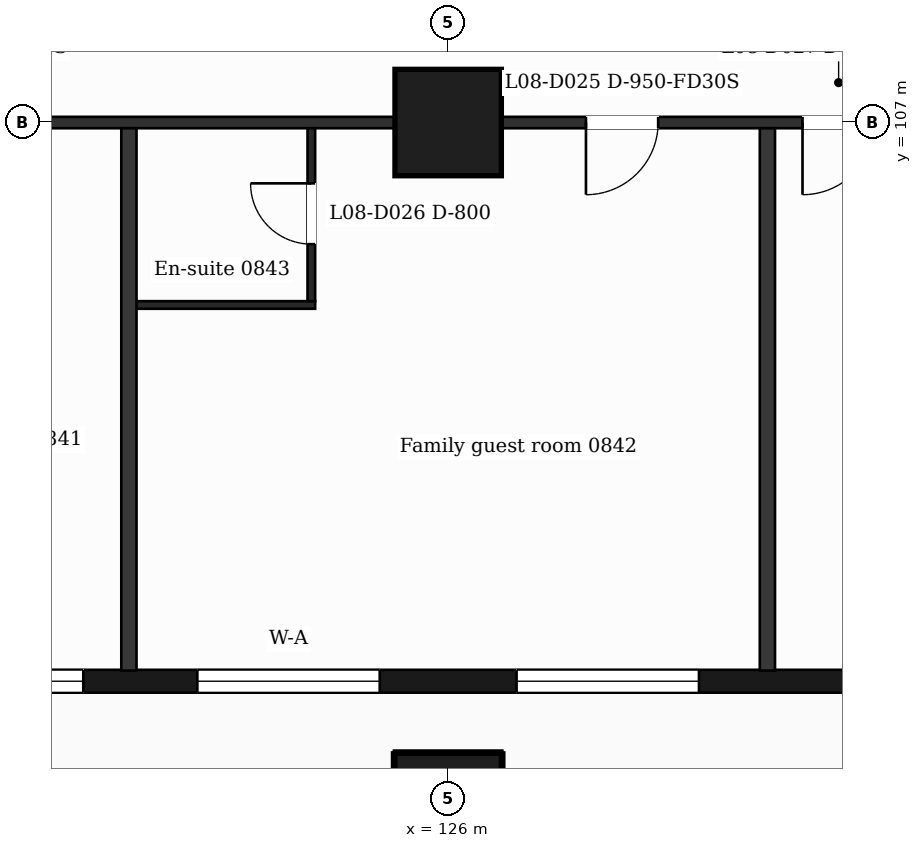
"""IFC4 building model, lengths in metres.
Left out: names, types, materials, properties, quantities, classifications, styles, units other than length and angle.
Written with IfcOpenShell. Run it as: python <this file> out.ifc"""

import sys

from ifc_helpers import new_model, si_unit, direction, frame, frame_2d, origin, origin_2d, place, context, subcontext, project, spatial, rectangle, extrude, element, fill, save


model = new_model("IFC4")
c1 = context("Model", 3, precision=1e-05, world=origin(), true_north=direction((0.0, 1.0)))
c2 = subcontext(c1, "Body", "Model", "MODEL_VIEW")
j1 = project(units=[si_unit("LENGTHUNIT", "METRE"), si_unit("PLANEANGLEUNIT", "RADIAN")], contexts=[c1])
p1 = place(None, origin())
s1 = spatial("IfcSite", under=j1, at=p1, CompositionType="ELEMENT")
p2 = place(p1, origin())
s2 = spatial("IfcBuilding", under=s1, at=p2, CompositionType="ELEMENT")
p3 = place(p2, frame((0.0, 0.0, 46.0)))
s3 = spatial("IfcBuildingStorey", under=s2, at=p3, CompositionType="ELEMENT", Elevation=46.0)
for number, where, z_axis, x_axis in (
    (1, (126.0, 98.0, 0.0), (0.0, 0.0, 1.0), (1.0, 0.0, 0.0)),
    (2, (126.0, 107.0, 0.0), (0.0, 0.0, 1.0), (1.0, 0.0, 0.0)),
):
    element("IfcColumn", number, at=place(p3, frame(where, z_axis=z_axis, x_axis=x_axis)), inside=s3, PredefinedType="COLUMN", context=c2, shape_type="SweptSolid", body=[
        extrude(rectangle(XDim=1.4, YDim=1.4, at=origin_2d()), origin(), (0.0, 0.0, 1.0), 3.5),
    ])
p4 = place(p3, frame((89.85, 99.65, 0.0), z_axis=(0.0, 0.0, 1.0), x_axis=(1.0, 0.0, 0.0)))
e3 = element("IfcWall", 3, at=p4, inside=s3, PredefinedType="SOLIDWALL", context=c2, shape_type="SweptSolid", body=[
    extrude(rectangle(XDim=47.25, YDim=0.3, at=frame_2d((23.625, 0.0))), origin(), (0.0, 0.0, 1.0), 3.18),
])
p5 = place(p4, frame((0.725, 0.0, 0.9)))
e4 = element("IfcOpeningElement", 4, at=p5, cuts=e3, PredefinedType="OPENING", context=c2, shape_type="SweptSolid", body=[
    extrude(rectangle(XDim=1.2, YDim=2.1, at=frame_2d((0.6, 1.05))), frame((0.0, 0.16, 0.0), z_axis=(0.0, -1.0, 0.0), x_axis=(1.0, 0.0, 0.0)), (0.0, 0.0, 1.0), 0.32),
])
p6 = place(p4, frame((3.45, 0.0, 0.9)))
e5 = element("IfcOpeningElement", 5, at=p6, cuts=e3, PredefinedType="OPENING", context=c2, shape_type="SweptSolid", body=[
    extrude(rectangle(XDim=2.4, YDim=2.1, at=frame_2d((1.2, 1.05))), frame((0.0, 0.16, 0.0), z_axis=(0.0, -1.0, 0.0), x_axis=(1.0, 0.0, 0.0)), (0.0, 0.0, 1.0), 0.32),
])
p7 = place(p4, frame((7.65, 0.0, 0.9)))
e6 = element("IfcOpeningElement", 6, at=p7, cuts=e3, PredefinedType="OPENING", context=c2, shape_type="SweptSolid", body=[
    extrude(rectangle(XDim=2.4, YDim=2.1, at=frame_2d((1.2, 1.05))), frame((0.0, 0.16, 0.0), z_axis=(0.0, -1.0, 0.0), x_axis=(1.0, 0.0, 0.0)), (0.0, 0.0, 1.0), 0.32),
])
p8 = place(p4, frame((12.45, 0.0, 0.9)))
e7 = element("IfcOpeningElement", 7, at=p8, cuts=e3, PredefinedType="OPENING", context=c2, shape_type="SweptSolid", body=[
    extrude(rectangle(XDim=1.2, YDim=2.1, at=frame_2d((0.6, 1.05))), frame((0.0, 0.16, 0.0), z_axis=(0.0, -1.0, 0.0), x_axis=(1.0, 0.0, 0.0)), (0.0, 0.0, 1.0), 0.32),
])
p9 = place(p4, frame((16.65, 0.0, 0.9)))
e8 = element("IfcOpeningElement", 8, at=p9, cuts=e3, PredefinedType="OPENING", context=c2, shape_type="SweptSolid", body=[
    extrude(rectangle(XDim=1.2, YDim=2.1, at=frame_2d((0.6, 1.05))), frame((0.0, 0.16, 0.0), z_axis=(0.0, -1.0, 0.0), x_axis=(1.0, 0.0, 0.0)), (0.0, 0.0, 1.0), 0.32),
])
p10 = place(p4, frame((19.95, 0.0, 0.9)))
e9 = element("IfcOpeningElement", 9, at=p10, cuts=e3, PredefinedType="OPENING", context=c2, shape_type="SweptSolid", body=[
    extrude(rectangle(XDim=1.2, YDim=2.1, at=frame_2d((0.6, 1.05))), frame((0.0, 0.16, 0.0), z_axis=(0.0, -1.0, 0.0), x_axis=(1.0, 0.0, 0.0)), (0.0, 0.0, 1.0), 0.32),
])
p11 = place(p4, frame((21.75, 0.0, 0.9)))
e10 = element("IfcOpeningElement", 10, at=p11, cuts=e3, PredefinedType="OPENING", context=c2, shape_type="SweptSolid", body=[
    extrude(rectangle(XDim=1.2, YDim=2.1, at=frame_2d((0.6, 1.05))), frame((0.0, 0.16, 0.0), z_axis=(0.0, -1.0, 0.0), x_axis=(1.0, 0.0, 0.0)), (0.0, 0.0, 1.0), 0.32),
])
p12 = place(p4, frame((25.05, 0.0, 0.0)))
e11 = element("IfcOpeningElement", 11, at=p12, cuts=e3, PredefinedType="OPENING", context=c2, shape_type="SweptSolid", body=[
    extrude(rectangle(XDim=1.2, YDim=2.4, at=frame_2d((0.6, 1.2))), frame((0.0, 0.16, 0.0), z_axis=(0.0, -1.0, 0.0), x_axis=(1.0, 0.0, 0.0)), (0.0, 0.0, 1.0), 0.32),
])
p13 = place(p4, frame((28.35, 0.0, 0.9)))
e12 = element("IfcOpeningElement", 12, at=p13, cuts=e3, PredefinedType="OPENING", context=c2, shape_type="SweptSolid", body=[
    extrude(rectangle(XDim=1.2, YDim=2.1, at=frame_2d((0.6, 1.05))), frame((0.0, 0.16, 0.0), z_axis=(0.0, -1.0, 0.0), x_axis=(1.0, 0.0, 0.0)), (0.0, 0.0, 1.0), 0.32),
])
p14 = place(p4, frame((30.15, 0.0, 0.9)))
e13 = element("IfcOpeningElement", 13, at=p14, cuts=e3, PredefinedType="OPENING", context=c2, shape_type="SweptSolid", body=[
    extrude(rectangle(XDim=1.2, YDim=2.1, at=frame_2d((0.6, 1.05))), frame((0.0, 0.16, 0.0), z_axis=(0.0, -1.0, 0.0), x_axis=(1.0, 0.0, 0.0)), (0.0, 0.0, 1.0), 0.32),
])
p15 = place(p4, frame((32.85, 0.0, 0.9)))
e14 = element("IfcOpeningElement", 14, at=p15, cuts=e3, PredefinedType="OPENING", context=c2, shape_type="SweptSolid", body=[
    extrude(rectangle(XDim=2.4, YDim=2.1, at=frame_2d((1.2, 1.05))), frame((0.0, 0.16, 0.0), z_axis=(0.0, -1.0, 0.0), x_axis=(1.0, 0.0, 0.0)), (0.0, 0.0, 1.0), 0.32),
])
p16 = place(p4, frame((37.05, 0.0, 0.9)))
e15 = element("IfcOpeningElement", 15, at=p16, cuts=e3, PredefinedType="OPENING", context=c2, shape_type="SweptSolid", body=[
    extrude(rectangle(XDim=2.4, YDim=2.1, at=frame_2d((1.2, 1.05))), frame((0.0, 0.16, 0.0), z_axis=(0.0, -1.0, 0.0), x_axis=(1.0, 0.0, 0.0)), (0.0, 0.0, 1.0), 0.32),
])
p17 = place(p4, frame((41.85, 0.0, 0.9)))
e16 = element("IfcOpeningElement", 16, at=p17, cuts=e3, PredefinedType="OPENING", context=c2, shape_type="SweptSolid", body=[
    extrude(rectangle(XDim=1.2, YDim=2.1, at=frame_2d((0.6, 1.05))), frame((0.0, 0.16, 0.0), z_axis=(0.0, -1.0, 0.0), x_axis=(1.0, 0.0, 0.0)), (0.0, 0.0, 1.0), 0.32),
])
p18 = place(p4, frame((45.25, 0.0, 0.9)))
e17 = element("IfcOpeningElement", 17, at=p18, cuts=e3, PredefinedType="OPENING", context=c2, shape_type="SweptSolid", body=[
    extrude(rectangle(XDim=1.2, YDim=2.1, at=frame_2d((0.6, 1.05))), frame((0.0, 0.16, 0.0), z_axis=(0.0, -1.0, 0.0), x_axis=(1.0, 0.0, 0.0)), (0.0, 0.0, 1.0), 0.32),
])
p19 = place(p3, frame((121.8, 104.6, 0.0), z_axis=(0.0, 0.0, 1.0), x_axis=(1.0, 0.0, 0.0)))
e18 = element("IfcWall", 18, at=p19, inside=s3, PredefinedType="PARTITIONING", context=c2, shape_type="SweptSolid", body=[
    extrude(rectangle(XDim=2.45, YDim=0.1, at=frame_2d((1.225, 0.0))), origin(), (0.0, 0.0, 1.0), 3.18),
])
p20 = place(p3, frame((87.018, 107.0, 0.0), z_axis=(0.0, 0.0, 1.0), x_axis=(1.0, 0.0, 0.0)))
e19 = element("IfcWall", 19, at=p20, inside=s3, PredefinedType="PARTITIONING", context=c2, shape_type="SweptSolid", body=[
    extrude(rectangle(XDim=52.765, YDim=0.15, at=frame_2d((26.382, 0.0))), origin(), (0.0, 0.0, 1.0), 3.18),
])
p21 = place(p20, frame((1.032, 0.0, 0.0)))
e20 = element("IfcOpeningElement", 20, at=p21, cuts=e19, PredefinedType="OPENING", context=c2, shape_type="SweptSolid", body=[
    extrude(rectangle(XDim=0.95, YDim=2.1, at=frame_2d((0.475, 1.05))), frame((0.0, 0.085, 0.0), z_axis=(0.0, -1.0, 0.0), x_axis=(1.0, 0.0, 0.0)), (0.0, 0.0, 1.0), 0.17),
])
p22 = place(p20, frame((6.369, 0.0, 0.0)))
e21 = element("IfcOpeningElement", 21, at=p22, cuts=e19, PredefinedType="OPENING", context=c2, shape_type="SweptSolid", body=[
    extrude(rectangle(XDim=0.95, YDim=2.1, at=frame_2d((0.475, 1.05))), frame((0.0, 0.085, 0.0), z_axis=(0.0, -1.0, 0.0), x_axis=(1.0, 0.0, 0.0)), (0.0, 0.0, 1.0), 0.17),
])
p23 = place(p20, frame((10.952, 0.0, 0.0)))
e22 = element("IfcOpeningElement", 22, at=p23, cuts=e19, PredefinedType="OPENING", context=c2, shape_type="SweptSolid", body=[
    extrude(rectangle(XDim=0.95, YDim=2.1, at=frame_2d((0.475, 1.05))), frame((0.0, 0.085, 0.0), z_axis=(0.0, -1.0, 0.0), x_axis=(1.0, 0.0, 0.0)), (0.0, 0.0, 1.0), 0.17),
])
p24 = place(p20, frame((16.045, 0.0, 0.0)))
e23 = element("IfcOpeningElement", 23, at=p24, cuts=e19, PredefinedType="OPENING", context=c2, shape_type="SweptSolid", body=[
    extrude(rectangle(XDim=0.95, YDim=2.1, at=frame_2d((0.475, 1.05))), frame((0.0, 0.085, 0.0), z_axis=(0.0, -1.0, 0.0), x_axis=(1.0, 0.0, 0.0)), (0.0, 0.0, 1.0), 0.17),
])
p25 = place(p20, frame((20.245, 0.0, 0.0)))
e24 = element("IfcOpeningElement", 24, at=p25, cuts=e19, PredefinedType="OPENING", context=c2, shape_type="SweptSolid", body=[
    extrude(rectangle(XDim=0.95, YDim=2.1, at=frame_2d((0.475, 1.05))), frame((0.0, 0.085, 0.0), z_axis=(0.0, -1.0, 0.0), x_axis=(1.0, 0.0, 0.0)), (0.0, 0.0, 1.0), 0.17),
])
p26 = place(p20, frame((24.969, 0.0, 0.0)))
e25 = element("IfcOpeningElement", 25, at=p26, cuts=e19, PredefinedType="OPENING", context=c2, shape_type="SweptSolid", body=[
    extrude(rectangle(XDim=0.95, YDim=2.1, at=frame_2d((0.475, 1.05))), frame((0.0, 0.085, 0.0), z_axis=(0.0, -1.0, 0.0), x_axis=(1.0, 0.0, 0.0)), (0.0, 0.0, 1.0), 0.17),
])
p27 = place(p20, frame((26.807, 0.0, 0.0)))
e26 = element("IfcOpeningElement", 26, at=p27, cuts=e19, PredefinedType="OPENING", context=c2, shape_type="SweptSolid", body=[
    extrude(rectangle(XDim=0.95, YDim=2.1, at=frame_2d((0.475, 1.05))), frame((0.0, 0.085, 0.0), z_axis=(0.0, -1.0, 0.0), x_axis=(1.0, 0.0, 0.0)), (0.0, 0.0, 1.0), 0.17),
])
p28 = place(p20, frame((31.952, 0.0, 0.0)))
e27 = element("IfcOpeningElement", 27, at=p28, cuts=e19, PredefinedType="OPENING", context=c2, shape_type="SweptSolid", body=[
    extrude(rectangle(XDim=0.95, YDim=2.1, at=frame_2d((0.475, 1.05))), frame((0.0, 0.085, 0.0), z_axis=(0.0, -1.0, 0.0), x_axis=(1.0, 0.0, 0.0)), (0.0, 0.0, 1.0), 0.17),
])
p29 = place(p20, frame((40.795, 0.0, 0.0)))
e28 = element("IfcOpeningElement", 28, at=p29, cuts=e19, PredefinedType="OPENING", context=c2, shape_type="SweptSolid", body=[
    extrude(rectangle(XDim=0.95, YDim=2.1, at=frame_2d((0.475, 1.05))), frame((0.0, 0.085, 0.0), z_axis=(0.0, -1.0, 0.0), x_axis=(1.0, 0.0, 0.0)), (0.0, 0.0, 1.0), 0.17),
])
p30 = place(p20, frame((43.644, 0.0, 0.0)))
e29 = element("IfcOpeningElement", 29, at=p30, cuts=e19, PredefinedType="OPENING", context=c2, shape_type="SweptSolid", body=[
    extrude(rectangle(XDim=0.95, YDim=2.1, at=frame_2d((0.475, 1.05))), frame((0.0, 0.085, 0.0), z_axis=(0.0, -1.0, 0.0), x_axis=(1.0, 0.0, 0.0)), (0.0, 0.0, 1.0), 0.17),
])
p31 = place(p20, frame((48.767, 0.0, 0.0)))
e30 = element("IfcOpeningElement", 30, at=p31, cuts=e19, PredefinedType="OPENING", context=c2, shape_type="SweptSolid", body=[
    extrude(rectangle(XDim=0.95, YDim=2.1, at=frame_2d((0.475, 1.05))), frame((0.0, 0.085, 0.0), z_axis=(0.0, -1.0, 0.0), x_axis=(1.0, 0.0, 0.0)), (0.0, 0.0, 1.0), 0.17),
])
p32 = place(p3, frame((121.8, 99.79, 0.0), z_axis=(0.0, 0.0, 1.0), x_axis=(0.0, 1.0, 0.0)))
e31 = element("IfcWall", 31, at=p32, inside=s3, PredefinedType="PARTITIONING", context=c2, shape_type="SweptSolid", body=[
    extrude(rectangle(XDim=7.135, YDim=0.2, at=frame_2d((3.567, 0.0))), origin(), (0.0, 0.0, 1.0), 3.18),
])
p33 = place(p3, frame((124.2, 104.65, 0.0), z_axis=(0.0, 0.0, 1.0), x_axis=(0.0, 1.0, 0.0)))
e32 = element("IfcWall", 32, at=p33, inside=s3, PredefinedType="PARTITIONING", context=c2, shape_type="SweptSolid", body=[
    extrude(rectangle(XDim=2.275, YDim=0.1, at=frame_2d((1.138, 0.0))), origin(), (0.0, 0.0, 1.0), 3.18),
])
p34 = place(p33, frame((0.75, 0.0, 0.0)))
e33 = element("IfcOpeningElement", 33, at=p34, cuts=e32, PredefinedType="OPENING", context=c2, shape_type="SweptSolid", body=[
    extrude(rectangle(XDim=0.8, YDim=2.1, at=frame_2d((0.4, 1.05))), frame((0.0, 0.06, 0.0), z_axis=(0.0, -1.0, 0.0), x_axis=(1.0, 0.0, 0.0)), (0.0, 0.0, 1.0), 0.12),
])
p35 = place(p3, frame((130.2, 99.79, 0.0), z_axis=(0.0, 0.0, 1.0), x_axis=(0.0, 1.0, 0.0)))
e34 = element("IfcWall", 34, at=p35, inside=s3, PredefinedType="PARTITIONING", context=c2, shape_type="SweptSolid", body=[
    extrude(rectangle(XDim=7.135, YDim=0.2, at=frame_2d((3.567, 0.0))), origin(), (0.0, 0.0, 1.0), 3.18),
])
p36 = place(p14, origin())
e35 = element("IfcWindow", 35, at=p36, inside=s3, PartitioningType="SINGLE_PANEL", PredefinedType="WINDOW", context=c2, shape_type="SweptSolid", body=[
    extrude(rectangle(XDim=1.2, YDim=2.1, at=frame_2d((0.6, 1.05))), frame((0.0, 0.03, 0.0), z_axis=(0.0, -1.0, 0.0), x_axis=(1.0, 0.0, 0.0)), (0.0, 0.0, 1.0), 0.06),
])
fill(e13, e35)
p37 = place(p15, origin())
e36 = element("IfcWindow", 36, at=p37, inside=s3, PartitioningType="SINGLE_PANEL", PredefinedType="WINDOW", context=c2, shape_type="SweptSolid", body=[
    extrude(rectangle(XDim=2.4, YDim=2.1, at=frame_2d((1.2, 1.05))), frame((0.0, 0.03, 0.0), z_axis=(0.0, -1.0, 0.0), x_axis=(1.0, 0.0, 0.0)), (0.0, 0.0, 1.0), 0.06),
])
fill(e14, e36)
p38 = place(p16, origin())
e37 = element("IfcWindow", 37, at=p38, inside=s3, PartitioningType="SINGLE_PANEL", PredefinedType="WINDOW", context=c2, shape_type="SweptSolid", body=[
    extrude(rectangle(XDim=2.4, YDim=2.1, at=frame_2d((1.2, 1.05))), frame((0.0, 0.03, 0.0), z_axis=(0.0, -1.0, 0.0), x_axis=(1.0, 0.0, 0.0)), (0.0, 0.0, 1.0), 0.06),
])
fill(e15, e37)
p39 = place(p29, origin())
e38 = element("IfcDoor", 38, at=p39, inside=s3, OperationType="SINGLE_SWING_LEFT", PredefinedType="DOOR", context=c2, shape_type="SweptSolid", body=[
    extrude(rectangle(XDim=0.95, YDim=2.1, at=frame_2d((0.475, 1.05))), frame((0.0, 0.025, 0.0), z_axis=(0.0, -1.0, 0.0), x_axis=(1.0, 0.0, 0.0)), (0.0, 0.0, 1.0), 0.05),
])
fill(e28, e38)
p40 = place(p34, origin())
e39 = element("IfcDoor", 39, at=p40, inside=s3, OperationType="SINGLE_SWING_RIGHT", PredefinedType="DOOR", context=c2, shape_type="SweptSolid", body=[
    extrude(rectangle(XDim=0.8, YDim=2.1, at=frame_2d((0.4, 1.05))), frame((0.0, 0.025, 0.0), z_axis=(0.0, -1.0, 0.0), x_axis=(1.0, 0.0, 0.0)), (0.0, 0.0, 1.0), 0.05),
])
fill(e33, e39)
p41 = place(p30, origin())
e40 = element("IfcDoor", 40, at=p41, inside=s3, OperationType="SINGLE_SWING_LEFT", PredefinedType="DOOR", context=c2, shape_type="SweptSolid", body=[
    extrude(rectangle(XDim=0.95, YDim=2.1, at=frame_2d((0.475, 1.05))), frame((0.0, 0.025, 0.0), z_axis=(0.0, -1.0, 0.0), x_axis=(1.0, 0.0, 0.0)), (0.0, 0.0, 1.0), 0.05),
])
fill(e29, e40)
save(model, sys.argv[1])
